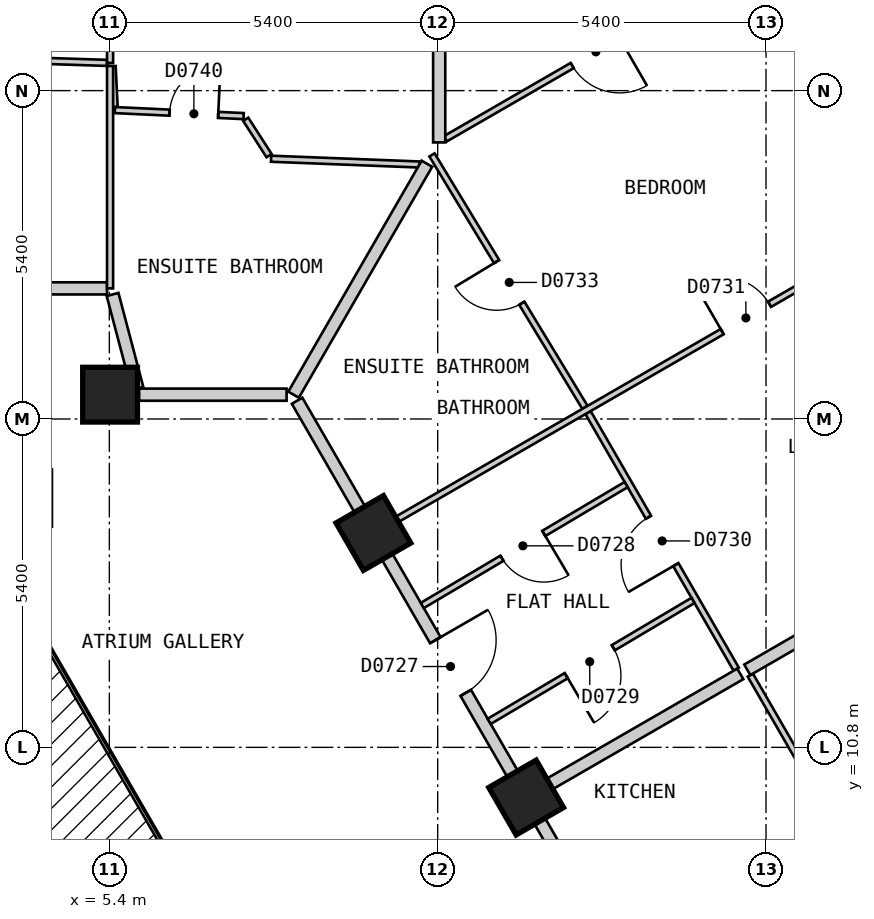
"""IFC4 building model, lengths in metres.
Left out: names, types, materials, properties, quantities, classifications, styles, units other than length and angle.
Written with IfcOpenShell. Run it as: python <this file> out.ifc"""

import sys

from ifc_helpers import new_model, si_unit, direction, frame, frame_2d, origin, origin_2d, place, context, subcontext, project, spatial, polyline, rectangle, outline, extrude, element, fill, save


model = new_model("IFC4")
c1 = context("Model", 3, precision=1e-05, world=origin(), true_north=direction((0.0, 1.0)))
c2 = subcontext(c1, "Body", "Model", "MODEL_VIEW")
j1 = project(units=[si_unit("LENGTHUNIT", "METRE"), si_unit("PLANEANGLEUNIT", "RADIAN")], contexts=[c1])
p1 = place(None, origin())
s1 = spatial("IfcSite", under=j1, at=p1, CompositionType="ELEMENT")
p2 = place(p1, origin())
s2 = spatial("IfcBuilding", under=s1, at=p2, CompositionType="ELEMENT")
p3 = place(p2, frame((0.0, 0.0, 105.0)))
s3 = spatial("IfcBuildingStorey", under=s2, at=p3, CompositionType="ELEMENT", Elevation=105.0)
for number, where, z_axis, x_axis in (
    (1, (12.255, 9.975, 0.0), (0.0, 0.0, 1.0), (-0.5, 0.866, 0.0)),
    (2, (9.743, 14.325, 0.0), (0.0, 0.0, 1.0), (-0.5, 0.866, 0.0)),
    (3, (5.412, 16.6, 0.0), (0.0, 0.0, 1.0), (-1.0, 0.0, 0.0)),
):
    element("IfcColumn", number, at=place(p3, frame(where, z_axis=z_axis, x_axis=x_axis)), inside=s3, PredefinedType="COLUMN", context=c2, shape_type="SweptSolid", body=[
        extrude(rectangle(XDim=0.9, YDim=0.9, at=origin_2d()), origin(), (0.0, 0.0, 1.0), 3.0),
    ])
p4 = place(p3, frame((29.027, 1.425, 0.0), z_axis=(0.0, 0.0, 1.0), x_axis=(-0.500027479704, 0.866009537788, 0.0)))
e4 = element("IfcWall", 4, at=p4, inside=s3, PredefinedType="SOLIDWALL", context=c2, shape_type="SweptSolid", body=[
    extrude(outline(polyline([(0.0, -0.15), (26.559, -0.15), (26.478, 0.15), (0.08, 0.15), (0.0, -0.15)])), origin(), (0.0, 0.0, 1.0), 2.6),
])
p5 = place(p4, frame((1.227, 0.0, 0.15)))
e5 = element("IfcOpeningElement", 5, at=p5, cuts=e4, PredefinedType="OPENING", context=c2, shape_type="SweptSolid", body=[
    extrude(rectangle(XDim=1.5, YDim=2.1, at=frame_2d((0.75, 1.05))), frame((0.0, 0.16, 0.0), z_axis=(0.0, -1.0, 0.0), x_axis=(1.0, 0.0, 0.0)), (0.0, 0.0, 1.0), 0.32),
])
p6 = place(p4, frame((3.738, 0.0, 0.15)))
e6 = element("IfcOpeningElement", 6, at=p6, cuts=e4, PredefinedType="OPENING", context=c2, shape_type="SweptSolid", body=[
    extrude(rectangle(XDim=1.5, YDim=2.1, at=frame_2d((0.75, 1.05))), frame((0.0, 0.16, 0.0), z_axis=(0.0, -1.0, 0.0), x_axis=(1.0, 0.0, 0.0)), (0.0, 0.0, 1.0), 0.32),
])
p7 = place(p4, frame((6.25, 0.0, 0.15)))
e7 = element("IfcOpeningElement", 7, at=p7, cuts=e4, PredefinedType="OPENING", context=c2, shape_type="SweptSolid", body=[
    extrude(rectangle(XDim=1.5, YDim=2.1, at=frame_2d((0.75, 1.05))), frame((0.0, 0.16, 0.0), z_axis=(0.0, -1.0, 0.0), x_axis=(1.0, 0.0, 0.0)), (0.0, 0.0, 1.0), 0.32),
])
p8 = place(p4, frame((8.761, 0.0, 0.15)))
e8 = element("IfcOpeningElement", 8, at=p8, cuts=e4, PredefinedType="OPENING", context=c2, shape_type="SweptSolid", body=[
    extrude(rectangle(XDim=1.5, YDim=2.1, at=frame_2d((0.75, 1.05))), frame((0.0, 0.16, 0.0), z_axis=(0.0, -1.0, 0.0), x_axis=(1.0, 0.0, 0.0)), (0.0, 0.0, 1.0), 0.32),
])
p9 = place(p4, frame((11.273, 0.0, 0.15)))
e9 = element("IfcOpeningElement", 9, at=p9, cuts=e4, PredefinedType="OPENING", context=c2, shape_type="SweptSolid", body=[
    extrude(rectangle(XDim=1.5, YDim=2.1, at=frame_2d((0.75, 1.05))), frame((0.0, 0.16, 0.0), z_axis=(0.0, -1.0, 0.0), x_axis=(1.0, 0.0, 0.0)), (0.0, 0.0, 1.0), 0.32),
])
p10 = place(p4, frame((13.785, 0.0, 0.15)))
e10 = element("IfcOpeningElement", 10, at=p10, cuts=e4, PredefinedType="OPENING", context=c2, shape_type="SweptSolid", body=[
    extrude(rectangle(XDim=1.5, YDim=2.1, at=frame_2d((0.75, 1.05))), frame((0.0, 0.16, 0.0), z_axis=(0.0, -1.0, 0.0), x_axis=(1.0, 0.0, 0.0)), (0.0, 0.0, 1.0), 0.32),
])
p11 = place(p4, frame((16.296, 0.0, 0.15)))
e11 = element("IfcOpeningElement", 11, at=p11, cuts=e4, PredefinedType="OPENING", context=c2, shape_type="SweptSolid", body=[
    extrude(rectangle(XDim=1.5, YDim=2.1, at=frame_2d((0.75, 1.05))), frame((0.0, 0.16, 0.0), z_axis=(0.0, -1.0, 0.0), x_axis=(1.0, 0.0, 0.0)), (0.0, 0.0, 1.0), 0.32),
])
p12 = place(p4, frame((18.807, 0.0, 0.15)))
e12 = element("IfcOpeningElement", 12, at=p12, cuts=e4, PredefinedType="OPENING", context=c2, shape_type="SweptSolid", body=[
    extrude(rectangle(XDim=1.5, YDim=2.1, at=frame_2d((0.75, 1.05))), frame((0.0, 0.16, 0.0), z_axis=(0.0, -1.0, 0.0), x_axis=(1.0, 0.0, 0.0)), (0.0, 0.0, 1.0), 0.32),
])
p13 = place(p4, frame((21.319, 0.0, 0.15)))
e13 = element("IfcOpeningElement", 13, at=p13, cuts=e4, PredefinedType="OPENING", context=c2, shape_type="SweptSolid", body=[
    extrude(rectangle(XDim=1.5, YDim=2.1, at=frame_2d((0.75, 1.05))), frame((0.0, 0.16, 0.0), z_axis=(0.0, -1.0, 0.0), x_axis=(1.0, 0.0, 0.0)), (0.0, 0.0, 1.0), 0.32),
])
p14 = place(p4, frame((23.831, 0.0, 0.15)))
e14 = element("IfcOpeningElement", 14, at=p14, cuts=e4, PredefinedType="OPENING", context=c2, shape_type="SweptSolid", body=[
    extrude(rectangle(XDim=1.5, YDim=2.1, at=frame_2d((0.75, 1.05))), frame((0.0, 0.16, 0.0), z_axis=(0.0, -1.0, 0.0), x_axis=(1.0, 0.0, 0.0)), (0.0, 0.0, 1.0), 0.32),
])
p15 = place(p3, frame((5.453, 18.248, 0.0), z_axis=(0.0, 0.0, 1.0), x_axis=(0.255687088482, -0.9667595941, 0.0)))
e15 = element("IfcWall", 15, at=p15, inside=s3, PredefinedType="PARTITIONING", context=c2, shape_type="SweptSolid", body=[
    extrude(rectangle(XDim=1.6, YDim=0.2, at=frame_2d((0.8, 0.0))), origin(), (0.0, 0.0, 1.0), 2.6),
])
p16 = place(p3, frame((8.488, 16.5, 0.0), z_axis=(0.0, 0.0, 1.0), x_axis=(0.499986836607, -0.86603300354, 0.0)))
e16 = element("IfcWall", 16, at=p16, inside=s3, PredefinedType="PARTITIONING", context=c2, shape_type="SweptSolid", body=[
    extrude(rectangle(XDim=20.09, YDim=0.2, at=frame_2d((10.045, 0.0))), origin(), (0.0, 0.0, 1.0), 2.6),
])
p17 = place(p16, frame((14.569, 0.0, 0.0)))
e17 = element("IfcOpeningElement", 17, at=p17, cuts=e16, PredefinedType="OPENING", context=c2, shape_type="SweptSolid", body=[
    extrude(rectangle(XDim=1.0, YDim=2.1, at=frame_2d((0.5, 1.05))), frame((0.0, 0.11, 0.0), z_axis=(0.0, -1.0, 0.0), x_axis=(1.0, 0.0, 0.0)), (0.0, 0.0, 1.0), 0.22),
])
p18 = place(p16, frame((4.547, 0.0, 0.0)))
e18 = element("IfcOpeningElement", 18, at=p18, cuts=e16, PredefinedType="OPENING", context=c2, shape_type="SweptSolid", body=[
    extrude(rectangle(XDim=1.0, YDim=2.1, at=frame_2d((0.5, 1.05))), frame((0.0, 0.11, 0.0), z_axis=(0.0, -1.0, 0.0), x_axis=(1.0, 0.0, 0.0)), (0.0, 0.0, 1.0), 0.22),
])
p19 = place(p3, frame((5.889, 16.6, 0.0), z_axis=(0.0, 0.0, 1.0), x_axis=(1.0, 0.0, 0.0)))
e19 = element("IfcWall", 19, at=p19, inside=s3, PredefinedType="PARTITIONING", context=c2, shape_type="SweptSolid", body=[
    extrude(rectangle(XDim=2.426, YDim=0.2, at=frame_2d((1.213, 0.0))), origin(), (0.0, 0.0, 1.0), 2.6),
])
p20 = place(p3, frame((1.75, 18.348, 0.0), z_axis=(0.0, 0.0, 1.0), x_axis=(1.0, 0.0, 0.0)))
e20 = element("IfcWall", 20, at=p20, inside=s3, PredefinedType="PARTITIONING", context=c2, shape_type="SweptSolid", body=[
    extrude(rectangle(XDim=3.612, YDim=0.2, at=frame_2d((1.806, 0.0))), origin(), (0.0, 0.0, 1.0), 2.6),
])
p21 = place(p3, frame((7.643, 21.129, 0.0), z_axis=(0.0, 0.0, 1.0), x_axis=(0.540427628168, -0.841390503104, 0.0)))
e21 = element("IfcWall", 21, at=p21, inside=s3, PredefinedType="PARTITIONING", context=c2, shape_type="SweptSolid", body=[
    extrude(rectangle(XDim=0.711, YDim=0.1, at=frame_2d((0.355, 0.0))), origin(), (0.0, 0.0, 1.0), 2.6),
])
p22 = place(p3, frame((10.706, 20.543, 0.0), z_axis=(0.0, 0.0, 1.0), x_axis=(0.518240414093, -0.855234981278, 0.0)))
e22 = element("IfcWall", 22, at=p22, inside=s3, PredefinedType="PARTITIONING", context=c2, shape_type="SweptSolid", body=[
    extrude(rectangle(XDim=4.855, YDim=0.1, at=frame_2d((2.427, 0.0))), origin(), (0.0, 0.0, 1.0), 2.6),
])
p23 = place(p22, frame((2.052, 0.0, 0.0)))
e23 = element("IfcOpeningElement", 23, at=p23, cuts=e22, PredefinedType="OPENING", context=c2, shape_type="SweptSolid", body=[
    extrude(rectangle(XDim=0.8, YDim=2.1, at=frame_2d((0.4, 1.05))), frame((0.0, 0.06, 0.0), z_axis=(0.0, -1.0, 0.0), x_axis=(1.0, 0.0, 0.0)), (0.0, 0.0, 1.0), 0.12),
])
p24 = place(p3, frame((13.273, 16.305, 0.0), z_axis=(0.0, 0.0, 1.0), x_axis=(0.500093956194, -0.865971151354, 0.0)))
e24 = element("IfcWall", 24, at=p24, inside=s3, PredefinedType="PARTITIONING", context=c2, shape_type="SweptSolid", body=[
    extrude(rectangle(XDim=4.873, YDim=0.1, at=frame_2d((2.437, 0.0))), origin(), (0.0, 0.0, 1.0), 2.6),
])
p25 = place(p24, frame((1.987, 0.0, 0.0)))
e25 = element("IfcOpeningElement", 25, at=p25, cuts=e24, PredefinedType="OPENING", context=c2, shape_type="SweptSolid", body=[
    extrude(rectangle(XDim=0.9, YDim=2.1, at=frame_2d((0.45, 1.05))), frame((0.0, 0.06, 0.0), z_axis=(0.0, -1.0, 0.0), x_axis=(1.0, 0.0, 0.0)), (0.0, 0.0, 1.0), 0.12),
])
p26 = place(p3, frame((15.942, 11.988, 0.0), z_axis=(0.0, 0.0, 1.0), x_axis=(0.499995794706, -0.866027831699, 0.0)))
e26 = element("IfcWall", 26, at=p26, inside=s3, PredefinedType="PARTITIONING", context=c2, shape_type="SweptSolid", body=[
    extrude(rectangle(XDim=4.922, YDim=0.1, at=frame_2d((2.461, 0.0))), origin(), (0.0, 0.0, 1.0), 2.6),
])
p27 = place(p3, frame((5.454, 22.002, 0.0), z_axis=(0.0, 0.0, 1.0), x_axis=(0.048996315227, -0.998798959298, 0.0)))
e27 = element("IfcWall", 27, at=p27, inside=s3, PredefinedType="PARTITIONING", context=c2, shape_type="SweptSolid", body=[
    extrude(rectangle(XDim=0.673, YDim=0.1, at=frame_2d((0.336, 0.0))), origin(), (0.0, 0.0, 1.0), 2.6),
])
p28 = place(p3, frame((5.412, 22.005, 0.0), z_axis=(0.0, 0.0, 1.0), x_axis=(0.0, -1.0, 0.0)))
e28 = element("IfcWall", 28, at=p28, inside=s3, PredefinedType="PARTITIONING", context=c2, shape_type="SweptSolid", body=[
    extrude(rectangle(XDim=3.657, YDim=0.1, at=frame_2d((1.829, 0.0))), origin(), (0.0, 0.0, 1.0), 2.6),
])
p29 = place(p3, frame((8.06, 20.48, 0.0), z_axis=(0.0, 0.0, 1.0), x_axis=(0.999243345912, -0.038893902497, 0.0)))
e29 = element("IfcWall", 29, at=p29, inside=s3, PredefinedType="PARTITIONING", context=c2, shape_type="SweptSolid", body=[
    extrude(rectangle(XDim=2.442, YDim=0.1, at=frame_2d((1.221, 0.0))), origin(), (0.0, 0.0, 1.0), 2.6),
])
p30 = place(p3, frame((0.049, 22.228, 0.0), z_axis=(0.0, 0.0, 1.0), x_axis=(0.99947566488, -0.032378933174, 0.0)))
e30 = element("IfcWall", 30, at=p30, inside=s3, PredefinedType="PARTITIONING", context=c2, shape_type="SweptSolid", body=[
    extrude(rectangle(XDim=5.316, YDim=0.1, at=frame_2d((2.658, 0.0))), origin(), (0.0, 0.0, 1.0), 2.6),
])
p31 = place(p3, frame((5.49, 21.28, 0.0), z_axis=(0.0, 0.0, 1.0), x_axis=(0.998907627838, -0.046728482187, 0.0)))
e31 = element("IfcWall", 31, at=p31, inside=s3, PredefinedType="PARTITIONING", context=c2, shape_type="SweptSolid", body=[
    extrude(rectangle(XDim=2.121, YDim=0.1, at=frame_2d((1.061, 0.0))), origin(), (0.0, 0.0, 1.0), 2.6),
])
p32 = place(p31, frame((0.902, 0.0, 0.0)))
e32 = element("IfcOpeningElement", 32, at=p32, cuts=e31, PredefinedType="OPENING", context=c2, shape_type="SweptSolid", body=[
    extrude(rectangle(XDim=0.8, YDim=2.1, at=frame_2d((0.4, 1.05))), frame((0.0, 0.06, 0.0), z_axis=(0.0, -1.0, 0.0), x_axis=(1.0, 0.0, 0.0)), (0.0, 0.0, 1.0), 0.12),
])
p33 = place(p3, frame((5.412, 22.055, 0.0), z_axis=(0.0, 0.0, 1.0), x_axis=(0.0, 1.0, 0.0)))
e33 = element("IfcWall", 33, at=p33, inside=s3, PredefinedType="PARTITIONING", context=c2, shape_type="SweptSolid", body=[
    extrude(rectangle(XDim=4.645, YDim=0.1, at=frame_2d((2.323, 0.0))), origin(), (0.0, 0.0, 1.0), 2.6),
])
p34 = place(p33, frame((1.873, 0.0, 0.0)))
e34 = element("IfcOpeningElement", 34, at=p34, cuts=e33, PredefinedType="OPENING", context=c2, shape_type="SweptSolid", body=[
    extrude(rectangle(XDim=0.9, YDim=2.1, at=frame_2d((0.45, 1.05))), frame((0.0, 0.06, 0.0), z_axis=(0.0, -1.0, 0.0), x_axis=(1.0, 0.0, 0.0)), (0.0, 0.0, 1.0), 0.12),
])
p35 = place(p3, frame((14.853, 5.675, 0.0), z_axis=(0.0, 0.0, 1.0), x_axis=(0.866016855193, 0.500014806302, 0.0)))
e35 = element("IfcWall", 35, at=p35, inside=s3, PredefinedType="PARTITIONING", context=c2, shape_type="SweptSolid", body=[
    extrude(rectangle(XDim=10.0, YDim=0.1, at=frame_2d((5.0, 0.0))), origin(), (0.0, 0.0, 1.0), 2.6),
])
p36 = place(p35, frame((1.6, 0.0, 0.0)))
e36 = element("IfcOpeningElement", 36, at=p36, cuts=e35, PredefinedType="OPENING", context=c2, shape_type="SweptSolid", body=[
    extrude(rectangle(XDim=0.8, YDim=2.1, at=frame_2d((0.4, 1.05))), frame((0.0, 0.06, 0.0), z_axis=(0.0, -1.0, 0.0), x_axis=(1.0, 0.0, 0.0)), (0.0, 0.0, 1.0), 0.12),
])
p37 = place(p35, frame((6.6, 0.0, 0.0)))
e37 = element("IfcOpeningElement", 37, at=p37, cuts=e35, PredefinedType="OPENING", context=c2, shape_type="SweptSolid", body=[
    extrude(rectangle(XDim=0.9, YDim=2.1, at=frame_2d((0.45, 1.05))), frame((0.0, 0.06, 0.0), z_axis=(0.0, -1.0, 0.0), x_axis=(1.0, 0.0, 0.0)), (0.0, 0.0, 1.0), 0.12),
])
p38 = place(p3, frame((9.83, 14.375, 0.0), z_axis=(0.0, 0.0, 1.0), x_axis=(0.866016855193, 0.500014806302, 0.0)))
e38 = element("IfcWall", 38, at=p38, inside=s3, PredefinedType="PARTITIONING", context=c2, shape_type="SweptSolid", body=[
    extrude(rectangle(XDim=10.0, YDim=0.1, at=frame_2d((5.0, 0.0))), origin(), (0.0, 0.0, 1.0), 2.6),
])
p39 = place(p38, frame((6.523, 0.0, 0.0)))
e39 = element("IfcOpeningElement", 39, at=p39, cuts=e38, PredefinedType="OPENING", context=c2, shape_type="SweptSolid", body=[
    extrude(rectangle(XDim=0.9, YDim=2.1, at=frame_2d((0.45, 1.05))), frame((0.0, 0.06, 0.0), z_axis=(0.0, -1.0, 0.0), x_axis=(1.0, 0.0, 0.0)), (0.0, 0.0, 1.0), 0.12),
])
p40 = place(p3, frame((10.926, 20.808, 0.0), z_axis=(0.0, 0.0, 1.0), x_axis=(0.86600925905, 0.500027962457, 0.0)))
e40 = element("IfcWall", 40, at=p40, inside=s3, PredefinedType="PARTITIONING", context=c2, shape_type="SweptSolid", body=[
    extrude(rectangle(XDim=5.834, YDim=0.1, at=frame_2d((2.917, 0.0))), origin(), (0.0, 0.0, 1.0), 2.6),
])
p41 = place(p40, frame((2.409, 0.0, 0.0)))
e41 = element("IfcOpeningElement", 41, at=p41, cuts=e40, PredefinedType="OPENING", context=c2, shape_type="SweptSolid", body=[
    extrude(rectangle(XDim=0.9, YDim=2.1, at=frame_2d((0.45, 1.05))), frame((0.0, 0.06, 0.0), z_axis=(0.0, -1.0, 0.0), x_axis=(1.0, 0.0, 0.0)), (0.0, 0.0, 1.0), 0.12),
])
p42 = place(p3, frame((11.647, 11.227, 0.0), z_axis=(0.0, 0.0, 1.0), x_axis=(0.859997349349, 0.510298500011, 0.0)))
e42 = element("IfcWall", 42, at=p42, inside=s3, PredefinedType="PARTITIONING", context=c2, shape_type="SweptSolid", body=[
    extrude(rectangle(XDim=3.898, YDim=0.1, at=frame_2d((1.949, 0.0))), origin(), (0.0, 0.0, 1.0), 2.6),
])
p43 = place(p42, frame((1.473, 0.0, 0.0)))
e43 = element("IfcOpeningElement", 43, at=p43, cuts=e42, PredefinedType="OPENING", context=c2, shape_type="SweptSolid", body=[
    extrude(rectangle(XDim=0.9, YDim=2.1, at=frame_2d((0.45, 1.05))), frame((0.0, 0.06, 0.0), z_axis=(0.0, -1.0, 0.0), x_axis=(1.0, 0.0, 0.0)), (0.0, 0.0, 1.0), 0.12),
])
p44 = place(p3, frame((10.547, 13.133, 0.0), z_axis=(0.0, 0.0, 1.0), x_axis=(0.860090994311, 0.510140648749, 0.0)))
e44 = element("IfcWall", 44, at=p44, inside=s3, PredefinedType="PARTITIONING", context=c2, shape_type="SweptSolid", body=[
    extrude(rectangle(XDim=3.897, YDim=0.1, at=frame_2d((1.948, 0.0))), origin(), (0.0, 0.0, 1.0), 2.6),
])
p45 = place(p44, frame((1.523, 0.0, 0.0)))
e45 = element("IfcOpeningElement", 45, at=p45, cuts=e44, PredefinedType="OPENING", context=c2, shape_type="SweptSolid", body=[
    extrude(rectangle(XDim=0.8, YDim=2.1, at=frame_2d((0.4, 1.05))), frame((0.0, 0.06, 0.0), z_axis=(0.0, -1.0, 0.0), x_axis=(1.0, 0.0, 0.0)), (0.0, 0.0, 1.0), 0.12),
])
p46 = place(p3, frame((8.43, 16.6, 0.0), z_axis=(0.0, 0.0, 1.0), x_axis=(0.500072613115, 0.865983476524, 0.0)))
e46 = element("IfcWall", 46, at=p46, inside=s3, PredefinedType="PARTITIONING", context=c2, shape_type="SweptSolid", body=[
    extrude(rectangle(XDim=4.385, YDim=0.2, at=frame_2d((2.193, 0.0))), origin(), (0.0, 0.0, 1.0), 2.6),
])
p47 = place(p3, frame((10.825, 20.748, 0.0), z_axis=(0.0, 0.0, 1.0), x_axis=(0.0, 1.0, 0.0)))
e47 = element("IfcWall", 47, at=p47, inside=s3, PredefinedType="PARTITIONING", context=c2, shape_type="SweptSolid", body=[
    extrude(rectangle(XDim=5.952, YDim=0.2, at=frame_2d((2.976, 0.0))), origin(), (0.0, 0.0, 1.0), 2.6),
])
p48 = place(p3, frame((12.342, 10.025, 0.0), z_axis=(0.0, 0.0, 1.0), x_axis=(0.866033886885, 0.499985306551, 0.0)))
e48 = element("IfcWall", 48, at=p48, inside=s3, PredefinedType="PARTITIONING", context=c2, shape_type="SweptSolid", body=[
    extrude(rectangle(XDim=3.966, YDim=0.2, at=frame_2d((1.983, 0.0))), origin(), (0.0, 0.0, 1.0), 2.6),
])
p49 = place(p3, frame((15.892, 12.075, 0.0), z_axis=(0.0, 0.0, 1.0), x_axis=(0.866000883696, 0.500042467634, 0.0)))
e49 = element("IfcWall", 49, at=p49, inside=s3, PredefinedType="PARTITIONING", context=c2, shape_type="SweptSolid", body=[
    extrude(rectangle(XDim=5.899, YDim=0.2, at=frame_2d((2.95, 0.0))), origin(), (0.0, 0.0, 1.0), 2.6),
])
p50 = place(p14, origin())
e50 = element("IfcWindow", 50, at=p50, inside=s3, PartitioningType="SINGLE_PANEL", PredefinedType="WINDOW", context=c2, shape_type="SweptSolid", body=[
    extrude(rectangle(XDim=1.5, YDim=2.1, at=frame_2d((0.75, 1.05))), frame((0.0, 0.03, 0.0), z_axis=(0.0, -1.0, 0.0), x_axis=(1.0, 0.0, 0.0)), (0.0, 0.0, 1.0), 0.06),
])
fill(e14, e50)
p51 = place(p18, origin())
e51 = element("IfcDoor", 51, at=p51, inside=s3, OperationType="SINGLE_SWING_LEFT", PredefinedType="DOOR", context=c2, shape_type="SweptSolid", body=[
    extrude(rectangle(XDim=1.0, YDim=2.1, at=frame_2d((0.5, 1.05))), frame((0.0, 0.025, 0.0), z_axis=(0.0, -1.0, 0.0), x_axis=(1.0, 0.0, 0.0)), (0.0, 0.0, 1.0), 0.05),
])
fill(e18, e51)
p52 = place(p45, origin())
e52 = element("IfcDoor", 52, at=p52, inside=s3, OperationType="SINGLE_SWING_RIGHT", PredefinedType="DOOR", context=c2, shape_type="SweptSolid", body=[
    extrude(rectangle(XDim=0.8, YDim=2.1, at=frame_2d((0.4, 1.05))), frame((0.0, 0.025, 0.0), z_axis=(0.0, -1.0, 0.0), x_axis=(1.0, 0.0, 0.0)), (0.0, 0.0, 1.0), 0.05),
])
fill(e45, e52)
p53 = place(p43, origin())
e53 = element("IfcDoor", 53, at=p53, inside=s3, OperationType="SINGLE_SWING_LEFT", PredefinedType="DOOR", context=c2, shape_type="SweptSolid", body=[
    extrude(rectangle(XDim=0.9, YDim=2.1, at=frame_2d((0.45, 1.05))), frame((0.0, 0.025, 0.0), z_axis=(0.0, -1.0, 0.0), x_axis=(1.0, 0.0, 0.0)), (0.0, 0.0, 1.0), 0.05),
])
fill(e43, e53)
p54 = place(p25, origin())
e54 = element("IfcDoor", 54, at=p54, inside=s3, OperationType="SINGLE_SWING_RIGHT", PredefinedType="DOOR", context=c2, shape_type="SweptSolid", body=[
    extrude(rectangle(XDim=0.9, YDim=2.1, at=frame_2d((0.45, 1.05))), frame((0.0, 0.025, 0.0), z_axis=(0.0, -1.0, 0.0), x_axis=(1.0, 0.0, 0.0)), (0.0, 0.0, 1.0), 0.05),
])
fill(e25, e54)
p55 = place(p39, origin())
e55 = element("IfcDoor", 55, at=p55, inside=s3, OperationType="SINGLE_SWING_LEFT", PredefinedType="DOOR", context=c2, shape_type="SweptSolid", body=[
    extrude(rectangle(XDim=0.9, YDim=2.1, at=frame_2d((0.45, 1.05))), frame((0.0, 0.025, 0.0), z_axis=(0.0, -1.0, 0.0), x_axis=(1.0, 0.0, 0.0)), (0.0, 0.0, 1.0), 0.05),
])
fill(e39, e55)
p56 = place(p41, origin())
e56 = element("IfcDoor", 56, at=p56, inside=s3, OperationType="SINGLE_SWING_RIGHT", PredefinedType="DOOR", context=c2, shape_type="SweptSolid", body=[
    extrude(rectangle(XDim=0.9, YDim=2.1, at=frame_2d((0.45, 1.05))), frame((0.0, 0.025, 0.0), z_axis=(0.0, -1.0, 0.0), x_axis=(1.0, 0.0, 0.0)), (0.0, 0.0, 1.0), 0.05),
])
fill(e41, e56)
p57 = place(p23, origin())
e57 = element("IfcDoor", 57, at=p57, inside=s3, OperationType="SINGLE_SWING_LEFT", PredefinedType="DOOR", context=c2, shape_type="SweptSolid", body=[
    extrude(rectangle(XDim=0.8, YDim=2.1, at=frame_2d((0.4, 1.05))), frame((0.0, 0.025, 0.0), z_axis=(0.0, -1.0, 0.0), x_axis=(1.0, 0.0, 0.0)), (0.0, 0.0, 1.0), 0.05),
])
fill(e23, e57)
p58 = place(p32, origin())
e58 = element("IfcDoor", 58, at=p58, inside=s3, OperationType="SINGLE_SWING_RIGHT", PredefinedType="DOOR", context=c2, shape_type="SweptSolid", body=[
    extrude(rectangle(XDim=0.8, YDim=2.1, at=frame_2d((0.4, 1.05))), frame((0.0, 0.025, 0.0), z_axis=(0.0, -1.0, 0.0), x_axis=(1.0, 0.0, 0.0)), (0.0, 0.0, 1.0), 0.05),
])
fill(e32, e58)
save(model, sys.argv[1])
